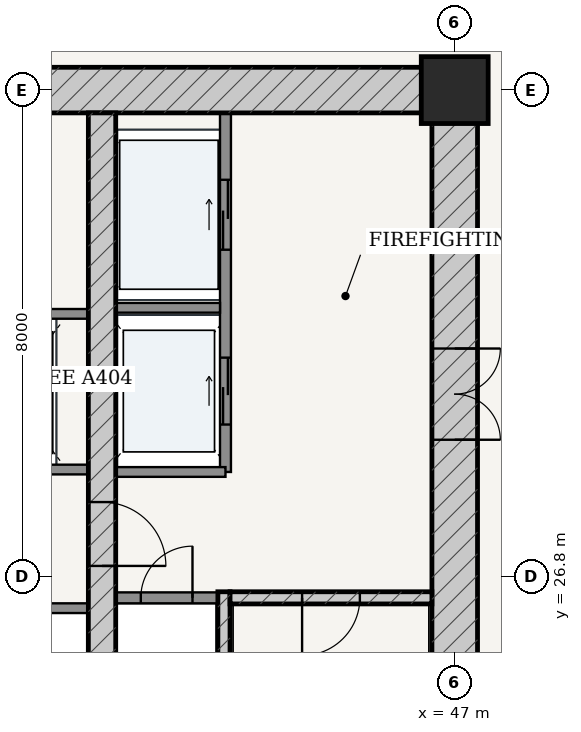
"""IFC4 building model, lengths in metres.
Left out: names, types, materials, properties, quantities, classifications, styles, units other than length and angle.
Written with IfcOpenShell. Run it as: python <this file> out.ifc"""

import sys

from ifc_helpers import new_model, si_unit, direction, frame, frame_2d, origin, origin_2d, place, context, subcontext, project, spatial, rectangle, extrude, source, transform, mapped, element, fill, save


model = new_model("IFC4")
c1 = context("Model", 3, precision=1e-05, world=origin(), true_north=direction((-0.2419218956, 0.970295726276)))
c2 = subcontext(c1, "Body", "Model", "MODEL_VIEW")
j1 = project(units=[si_unit("LENGTHUNIT", "METRE"), si_unit("PLANEANGLEUNIT", "RADIAN")], contexts=[c1])
p1 = place(None, origin())
s1 = spatial("IfcSite", under=j1, at=p1, CompositionType="ELEMENT")
p2 = place(p1, origin())
s2 = spatial("IfcBuilding", under=s1, at=p2, CompositionType="ELEMENT")
p3 = place(p2, frame((0.0, 0.0, 5.4)))
s3 = spatial("IfcBuildingStorey", under=s2, at=p3, CompositionType="ELEMENT", Elevation=5.4)
p4 = place(p3, frame((47.0, 34.8, 0.0), z_axis=(0.0, 0.0, 1.0), x_axis=(1.0, 0.0, 0.0)))
e1 = element("IfcColumn", 1, at=p4, inside=s3, PredefinedType="COLUMN", context=c2, shape_type="SweptSolid", body=[
    extrude(rectangle(XDim=1.1, YDim=1.1, at=origin_2d()), origin(), (0.0, 0.0, 1.0), 4.5),
])
p5 = place(p3, frame((28.625, 34.8, 0.0), z_axis=(0.0, 0.0, 1.0), x_axis=(1.0, 0.0, 0.0)))
e2 = element("IfcWall", 2, at=p5, inside=s3, PredefinedType="SHEAR", context=c2, shape_type="SweptSolid", body=[
    extrude(rectangle(XDim=18.75, YDim=0.75, at=frame_2d((9.375, 0.0))), origin(), (0.0, 0.0, 1.0), 4.2),
])
p6 = place(p5, frame((8.95, 0.0, 0.0)))
e3 = element("IfcOpeningElement", 3, at=p6, cuts=e2, PredefinedType="OPENING", context=c2, shape_type="SweptSolid", body=[
    extrude(rectangle(XDim=0.85, YDim=2.1, at=frame_2d((0.425, 1.05))), frame((0.0, 0.385, 0.0), z_axis=(0.0, -1.0, 0.0), x_axis=(1.0, 0.0, 0.0)), (0.0, 0.0, 1.0), 0.77),
])
p7 = place(p3, frame((47.0, 19.175, 0.0), z_axis=(0.0, 0.0, 1.0), x_axis=(0.0, 1.0, 0.0)))
e4 = element("IfcWall", 4, at=p7, inside=s3, PredefinedType="SHEAR", context=c2, shape_type="SweptSolid", body=[
    extrude(rectangle(XDim=15.25, YDim=0.75, at=frame_2d((7.625, 0.0))), origin(), (0.0, 0.0, 1.0), 4.2),
])
p8 = place(p7, frame((9.875, 0.0, 0.0)))
e5 = element("IfcOpeningElement", 5, at=p8, cuts=e4, PredefinedType="OPENING", context=c2, shape_type="SweptSolid", body=[
    extrude(rectangle(XDim=1.5, YDim=2.2, at=frame_2d((0.75, 1.1))), frame((0.0, 0.385, 0.0), z_axis=(0.0, -1.0, 0.0), x_axis=(1.0, 0.0, 0.0)), (0.0, 0.0, 1.0), 0.77),
])
p9 = place(p3, frame((43.205, 19.175, 0.0), z_axis=(0.0, 0.0, 1.0), x_axis=(0.0, 1.0, 0.0)))
e6 = element("IfcWall", 6, at=p9, inside=s3, PredefinedType="SOLIDWALL", context=c2, shape_type="SweptSolid", body=[
    extrude(rectangle(XDim=7.375, YDim=0.2, at=frame_2d((3.688, 0.0))), origin(), (0.0, 0.0, 1.0), 4.2),
])
p10 = place(p3, frame((43.305, 26.45, 0.0), z_axis=(0.0, 0.0, 1.0), x_axis=(1.0, 0.0, 0.0)))
e7 = element("IfcWall", 7, at=p10, inside=s3, PredefinedType="SOLIDWALL", context=c2, shape_type="SweptSolid", body=[
    extrude(rectangle(XDim=3.32, YDim=0.2, at=frame_2d((1.66, 0.0))), origin(), (0.0, 0.0, 1.0), 4.2),
])
p11 = place(p10, frame((1.185, 0.0, 0.0)))
e8 = element("IfcOpeningElement", 8, at=p11, cuts=e7, PredefinedType="OPENING", context=c2, shape_type="SweptSolid", body=[
    extrude(rectangle(XDim=0.95, YDim=2.15, at=frame_2d((0.475, 1.075))), frame((0.0, 0.11, 0.0), z_axis=(0.0, -1.0, 0.0), x_axis=(1.0, 0.0, 0.0)), (0.0, 0.0, 1.0), 0.22),
])
p12 = place(p3, frame((41.2, 19.175, 0.0), z_axis=(0.0, 0.0, 1.0), x_axis=(0.0, 1.0, 0.0)))
e9 = element("IfcWall", 9, at=p12, inside=s3, PredefinedType="SHEAR", context=c2, shape_type="SweptSolid", body=[
    extrude(rectangle(XDim=15.25, YDim=0.45, at=frame_2d((7.625, 0.0))), origin(), (0.0, 0.0, 1.0), 4.2),
])
p13 = place(p12, frame((7.8, 0.0, 0.0)))
e10 = element("IfcOpeningElement", 10, at=p13, cuts=e9, PredefinedType="OPENING", context=c2, shape_type="SweptSolid", body=[
    extrude(rectangle(XDim=1.05, YDim=2.15, at=frame_2d((0.525, 1.075))), frame((0.0, 0.235, 0.0), z_axis=(0.0, -1.0, 0.0), x_axis=(1.0, 0.0, 0.0)), (0.0, 0.0, 1.0), 0.47),
])
p14 = place(p3, frame((41.425, 26.45, 0.0), z_axis=(0.0, 0.0, 1.0), x_axis=(1.0, 0.0, 0.0)))
e11 = element("IfcWall", 11, at=p14, inside=s3, PredefinedType="PARTITIONING", context=c2, shape_type="SweptSolid", body=[
    extrude(rectangle(XDim=1.675, YDim=0.18, at=frame_2d((0.837, 0.0))), origin(), (0.0, 0.0, 1.0), 4.2),
])
p15 = place(p14, frame((0.413, 0.0, 0.0)))
e12 = element("IfcOpeningElement", 12, at=p15, cuts=e11, PredefinedType="OPENING", context=c2, shape_type="SweptSolid", body=[
    extrude(rectangle(XDim=0.85, YDim=2.1, at=frame_2d((0.425, 1.05))), frame((0.0, 0.1, 0.0), z_axis=(0.0, -1.0, 0.0), x_axis=(1.0, 0.0, 0.0)), (0.0, 0.0, 1.0), 0.2),
])
p16 = place(p3, frame((43.23, 28.52, 0.0), z_axis=(0.0, 0.0, 1.0), x_axis=(0.0, 1.0, 0.0)))
e13 = element("IfcWall", 13, at=p16, inside=s3, PredefinedType="PARTITIONING", context=c2, shape_type="SweptSolid", body=[
    extrude(rectangle(XDim=5.905, YDim=0.18, at=frame_2d((2.953, 0.0))), origin(), (0.0, 0.0, 1.0), 4.2),
])
p17 = place(p16, frame((3.655, 0.0, 0.0)))
e14 = element("IfcOpeningElement", 14, at=p17, cuts=e13, PredefinedType="OPENING", context=c2, shape_type="SweptSolid", body=[
    extrude(rectangle(XDim=1.15, YDim=2.2, at=frame_2d((0.575, 1.1))), frame((0.0, 0.1, 0.0), z_axis=(0.0, -1.0, 0.0), x_axis=(1.0, 0.0, 0.0)), (0.0, 0.0, 1.0), 0.2),
])
p18 = place(p16, frame((0.78, 0.0, 0.0)))
e15 = element("IfcOpeningElement", 15, at=p18, cuts=e13, PredefinedType="OPENING", context=c2, shape_type="SweptSolid", body=[
    extrude(rectangle(XDim=1.1, YDim=2.2, at=frame_2d((0.55, 1.1))), frame((0.0, 0.1, 0.0), z_axis=(0.0, -1.0, 0.0), x_axis=(1.0, 0.0, 0.0)), (0.0, 0.0, 1.0), 0.2),
])
p19 = place(p3, frame((41.425, 31.22, 0.0), z_axis=(0.0, 0.0, 1.0), x_axis=(1.0, 0.0, 0.0)))
e16 = element("IfcWall", 16, at=p19, inside=s3, PredefinedType="PARTITIONING", context=c2, shape_type="SweptSolid", body=[
    extrude(rectangle(XDim=1.715, YDim=0.16, at=frame_2d((0.857, 0.0))), origin(), (0.0, 0.0, 1.0), 4.2),
])
p20 = place(p3, frame((41.425, 28.52, 0.0), z_axis=(0.0, 0.0, 1.0), x_axis=(1.0, 0.0, 0.0)))
e17 = element("IfcWall", 17, at=p20, inside=s3, PredefinedType="PARTITIONING", context=c2, shape_type="SweptSolid", body=[
    extrude(rectangle(XDim=1.805, YDim=0.16, at=frame_2d((0.902, 0.0))), origin(), (0.0, 0.0, 1.0), 4.2),
])
p21 = place(p3, frame((35.025, 28.56, 0.0), z_axis=(0.0, 0.0, 1.0), x_axis=(1.0, 0.0, 0.0)))
e18 = element("IfcWall", 18, at=p21, inside=s3, PredefinedType="PARTITIONING", context=c2, shape_type="SweptSolid", body=[
    extrude(rectangle(XDim=5.95, YDim=0.16, at=frame_2d((2.975, 0.0))), origin(), (0.0, 0.0, 1.0), 4.2),
])
p22 = place(p21, frame((0.76, 0.0, 0.0)))
e19 = element("IfcOpeningElement", 19, at=p22, cuts=e18, PredefinedType="OPENING", context=c2, shape_type="SweptSolid", body=[
    extrude(rectangle(XDim=1.1, YDim=2.2, at=frame_2d((0.55, 1.1))), frame((0.0, 0.09, 0.0), z_axis=(0.0, -1.0, 0.0), x_axis=(1.0, 0.0, 0.0)), (0.0, 0.0, 1.0), 0.18),
])
p23 = place(p21, frame((2.425, 0.0, 0.0)))
e20 = element("IfcOpeningElement", 20, at=p23, cuts=e18, PredefinedType="OPENING", context=c2, shape_type="SweptSolid", body=[
    extrude(rectangle(XDim=1.1, YDim=2.2, at=frame_2d((0.55, 1.1))), frame((0.0, 0.09, 0.0), z_axis=(0.0, -1.0, 0.0), x_axis=(1.0, 0.0, 0.0)), (0.0, 0.0, 1.0), 0.18),
])
p24 = place(p21, frame((4.09, 0.0, 0.0)))
e21 = element("IfcOpeningElement", 21, at=p24, cuts=e18, PredefinedType="OPENING", context=c2, shape_type="SweptSolid", body=[
    extrude(rectangle(XDim=1.1, YDim=2.2, at=frame_2d((0.55, 1.1))), frame((0.0, 0.09, 0.0), z_axis=(0.0, -1.0, 0.0), x_axis=(1.0, 0.0, 0.0)), (0.0, 0.0, 1.0), 0.18),
])
for number, where, z_axis, x_axis in (
    (22, (35.025, 31.12, 0.0), (0.0, 0.0, 1.0), (1.0, 0.0, 0.0)),
    (23, (35.025, 26.28, 0.0), (0.0, 0.0, 1.0), (1.0, 0.0, 0.0)),
):
    element("IfcWall", number, at=place(p3, frame(where, z_axis=z_axis, x_axis=x_axis)), inside=s3, PredefinedType="PARTITIONING", context=c2, shape_type="SweptSolid", body=[
        extrude(rectangle(XDim=5.95, YDim=0.16, at=frame_2d((2.975, 0.0))), origin(), (0.0, 0.0, 1.0), 4.2),
    ])
m1 = source(origin(), c2, "Body", "SweptSolid", [
    extrude(rectangle(XDim=1.5, YDim=2.2, at=frame_2d((0.75, 1.1))), frame((0.0, 0.025, 0.0), z_axis=(0.0, -1.0, 0.0), x_axis=(1.0, 0.0, 0.0)), (0.0, 0.0, 1.0), 0.05),
])
p25 = place(p8, frame((1.5, 0.0, 0.0), z_axis=(0.0, 0.0, 1.0), x_axis=(-1.0, 0.0, 0.0)))
e24 = element("IfcDoor", 24, at=p25, inside=s3, OperationType="DOUBLE_DOOR_SINGLE_SWING", PredefinedType="DOOR", context=c2, shape_type="MappedRepresentation", body=[
    mapped(m1, transform((0.0, 0.0, 0.0), scale=1.0)),
])
fill(e5, e24)
m2 = source(origin(), c2, "Body", "SweptSolid", [
    extrude(rectangle(XDim=1.05, YDim=2.15, at=frame_2d((0.525, 1.075))), frame((0.0, 0.025, 0.0), z_axis=(0.0, -1.0, 0.0), x_axis=(1.0, 0.0, 0.0)), (0.0, 0.0, 1.0), 0.05),
])
p26 = place(p13, frame((1.05, 0.0, 0.0), z_axis=(0.0, 0.0, 1.0), x_axis=(-1.0, 0.0, 0.0)))
e25 = element("IfcDoor", 25, at=p26, inside=s3, OperationType="SINGLE_SWING_RIGHT", PredefinedType="DOOR", context=c2, shape_type="MappedRepresentation", body=[
    mapped(m2, transform((0.0, 0.0, 0.0), scale=1.0)),
])
fill(e10, e25)
m3 = source(origin(), c2, "Body", "SweptSolid", [
    extrude(rectangle(XDim=0.95, YDim=2.15, at=frame_2d((0.475, 1.075))), frame((0.0, 0.025, 0.0), z_axis=(0.0, -1.0, 0.0), x_axis=(1.0, 0.0, 0.0)), (0.0, 0.0, 1.0), 0.05),
])
p27 = place(p11, frame((0.95, 0.0, 0.0), z_axis=(0.0, 0.0, 1.0), x_axis=(-1.0, 0.0, 0.0)))
e26 = element("IfcDoor", 26, at=p27, inside=s3, OperationType="SINGLE_SWING_RIGHT", PredefinedType="DOOR", context=c2, shape_type="MappedRepresentation", body=[
    mapped(m3, transform((0.0, 0.0, 0.0), scale=1.0)),
])
fill(e8, e26)
m4 = source(origin(), c2, "Body", "SweptSolid", [
    extrude(rectangle(XDim=0.85, YDim=2.1, at=frame_2d((0.425, 1.05))), frame((0.0, 0.025, 0.0), z_axis=(0.0, -1.0, 0.0), x_axis=(1.0, 0.0, 0.0)), (0.0, 0.0, 1.0), 0.05),
])
p28 = place(p15, origin())
e27 = element("IfcDoor", 27, at=p28, inside=s3, OperationType="SINGLE_SWING_RIGHT", PredefinedType="DOOR", context=c2, shape_type="MappedRepresentation", body=[
    mapped(m4, transform((0.0, 0.0, 0.0), scale=1.0)),
])
fill(e12, e27)
m5 = source(origin(), c2, "Body", "SweptSolid", [
    extrude(rectangle(XDim=1.15, YDim=2.2, at=frame_2d((0.575, 1.1))), frame((0.0, 0.025, 0.0), z_axis=(0.0, -1.0, 0.0), x_axis=(1.0, 0.0, 0.0)), (0.0, 0.0, 1.0), 0.05),
])
p29 = place(p17, origin())
e28 = element("IfcDoor", 28, at=p29, inside=s3, OperationType="DOUBLE_DOOR_SLIDING", PredefinedType="DOOR", context=c2, shape_type="MappedRepresentation", body=[
    mapped(m5, transform((0.0, 0.0, 0.0), scale=1.0)),
])
fill(e14, e28)
m6 = source(origin(), c2, "Body", "SweptSolid", [
    extrude(rectangle(XDim=1.1, YDim=2.2, at=frame_2d((0.55, 1.1))), frame((0.0, 0.025, 0.0), z_axis=(0.0, -1.0, 0.0), x_axis=(1.0, 0.0, 0.0)), (0.0, 0.0, 1.0), 0.05),
])
p30 = place(p18, origin())
e29 = element("IfcDoor", 29, at=p30, inside=s3, OperationType="DOUBLE_DOOR_SLIDING", PredefinedType="DOOR", context=c2, shape_type="MappedRepresentation", body=[
    mapped(m6, transform((0.0, 0.0, 0.0), scale=1.0)),
])
fill(e15, e29)
save(model, sys.argv[1])
